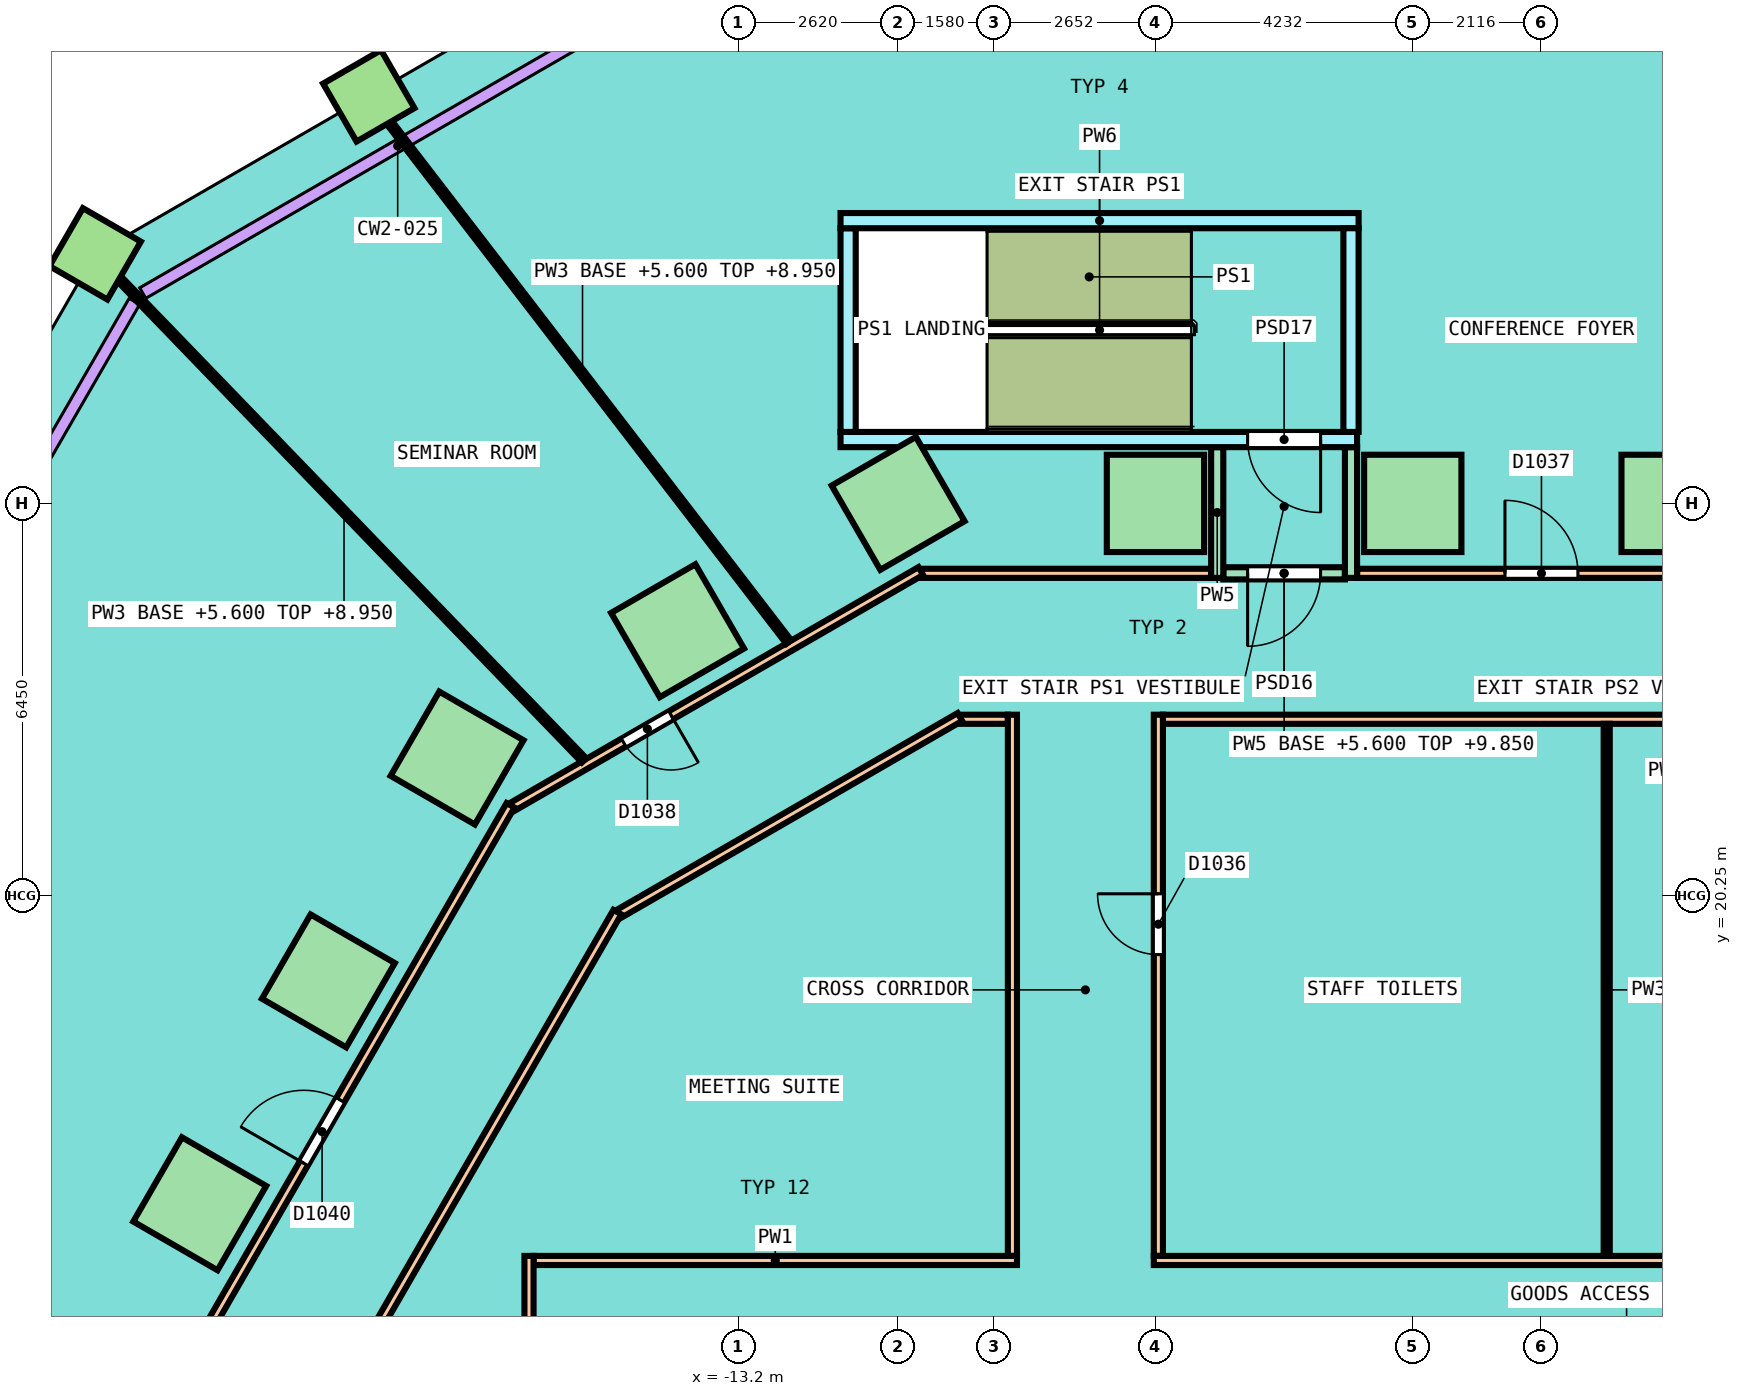
"""IFC4 building model, lengths in metres.
Left out: names, types, materials, properties, quantities, classifications, styles, units other than length and angle.
Written with IfcOpenShell. Run it as: python <this file> out.ifc"""

import sys

from ifc_helpers import new_model, si_unit, direction, frame, frame_2d, origin, origin_2d, place, context, subcontext, project, spatial, rectangle, extrude, element, fill, save


model = new_model("IFC4")
c1 = context("Model", 3, precision=1e-05, world=origin(), true_north=direction((0.0, 1.0)))
c2 = subcontext(c1, "Body", "Model", "MODEL_VIEW")
j1 = project(units=[si_unit("LENGTHUNIT", "METRE"), si_unit("PLANEANGLEUNIT", "RADIAN")], contexts=[c1])
p1 = place(None, origin())
s1 = spatial("IfcSite", under=j1, at=p1, CompositionType="ELEMENT")
p2 = place(p1, origin())
s2 = spatial("IfcBuilding", under=s1, at=p2, CompositionType="ELEMENT")
p3 = place(p2, frame((0.0, 0.0, 5.6)))
s3 = spatial("IfcBuildingStorey", under=s2, at=p3, CompositionType="ELEMENT", Elevation=5.6)
for number, where, z_axis, x_axis in (
    (1, (2.116, 26.7, 0.0), (0.0, 0.0, 1.0), (-1.0, 0.0, 0.0)),
    (2, (-2.116, 26.7, 0.0), (0.0, 0.0, 1.0), (-1.0, 0.0, 0.0)),
    (3, (-6.348, 26.7, 0.0), (0.0, 0.0, 1.0), (-1.0, 0.0, 0.0)),
    (4, (-10.58, 26.7, 0.0), (0.0, 0.0, 1.0), (-0.866, -0.5, 0.0)),
    (5, (-14.206, 24.606, 0.0), (0.0, 0.0, 1.0), (-0.866, -0.5, 0.0)),
    (6, (-17.833, 22.512, 0.0), (0.0, 0.0, 1.0), (-0.5, -0.866, 0.0)),
    (7, (-19.949, 18.847, 0.0), (0.0, 0.0, 1.0), (-0.5, -0.866, 0.0)),
    (8, (-22.065, 15.183, 0.0), (0.0, 0.0, 1.0), (-0.5, -0.866, 0.0)),
):
    element("IfcColumn", number, at=place(p3, frame(where, z_axis=z_axis, x_axis=x_axis)), inside=s3, PredefinedType="COLUMN", context=c2, shape_type="SweptSolid", body=[
        extrude(rectangle(XDim=1.6, YDim=1.6, at=origin_2d()), origin(), (0.0, 0.0, 1.0), 4.25),
    ])
for number, where, z_axis, x_axis in (
    (9, (-19.285, 33.402, 0.0), (0.0, 0.0, 1.0), (-0.866, -0.5, 0.0)),
    (10, (-23.785, 30.804, 0.0), (0.0, 0.0, 1.0), (-0.5, -0.866, 0.0)),
):
    element("IfcColumn", number, at=place(p3, frame(where, z_axis=z_axis, x_axis=x_axis)), inside=s3, PredefinedType="COLUMN", context=c2, shape_type="SweptSolid", body=[
        extrude(rectangle(XDim=1.1, YDim=1.1, at=origin_2d()), origin(), (0.0, 0.0, 1.0), 4.25),
    ])
p4 = place(p3, frame((-9.554, 23.15, 0.0), z_axis=(0.0, 0.0, 1.0), x_axis=(1.0, 0.0, 0.0)))
e11 = element("IfcWall", 11, at=p4, inside=s3, PredefinedType="PARTITIONING", context=c2, shape_type="SweptSolid", body=[
    extrude(rectangle(XDim=0.779, YDim=0.15, at=frame_2d((0.389, 0.0))), origin(), (0.0, 0.0, 1.0), 3.2),
])
p5 = place(p3, frame((-6.225, 23.15, 0.0), z_axis=(0.0, 0.0, 1.0), x_axis=(1.0, 0.0, 0.0)))
e12 = element("IfcWall", 12, at=p5, inside=s3, PredefinedType="PARTITIONING", context=c2, shape_type="SweptSolid", body=[
    extrude(rectangle(XDim=15.929, YDim=0.15, at=frame_2d((7.964, 0.0))), origin(), (0.0, 0.0, 1.0), 3.2),
])
p6 = place(p3, frame((-10.197, 25.55, 0.0), z_axis=(0.0, 0.0, 1.0), x_axis=(1.0, 0.0, 0.0)))
e13 = element("IfcWall", 13, at=p6, inside=s3, PredefinedType="PARTITIONING", context=c2, shape_type="SweptSolid", body=[
    extrude(rectangle(XDim=4.765, YDim=0.15, at=frame_2d((2.382, 0.0))), origin(), (0.0, 0.0, 1.0), 3.2),
])
p7 = place(p3, frame((-3.032, 25.55, 0.0), z_axis=(0.0, 0.0, 1.0), x_axis=(1.0, 0.0, 0.0)))
e14 = element("IfcWall", 14, at=p7, inside=s3, PredefinedType="PARTITIONING", context=c2, shape_type="SweptSolid", body=[
    extrude(rectangle(XDim=6.064, YDim=0.15, at=frame_2d((3.032, 0.0))), origin(), (0.0, 0.0, 1.0), 3.2),
])
p8 = place(p7, frame((2.432, 0.0, 0.0)))
e15 = element("IfcOpeningElement", 15, at=p8, cuts=e14, PredefinedType="OPENING", context=c2, shape_type="SweptSolid", body=[
    extrude(rectangle(XDim=1.2, YDim=2.1, at=frame_2d((0.6, 1.05))), frame((0.0, 0.085, 0.0), z_axis=(0.0, -1.0, 0.0), x_axis=(1.0, 0.0, 0.0)), (0.0, 0.0, 1.0), 0.17),
])
p9 = place(p3, frame((-16.926, 21.708, 0.0), z_axis=(0.0, 0.0, 1.0), x_axis=(0.866023143435, 0.50000391502, 0.0)))
e16 = element("IfcWall", 16, at=p9, inside=s3, PredefinedType="PARTITIONING", context=c2, shape_type="SweptSolid", body=[
    extrude(rectangle(XDim=7.759, YDim=0.15, at=frame_2d((3.879, 0.0))), origin(), (0.0, 0.0, 1.0), 3.2),
])
p10 = place(p9, frame((2.117, 0.0, 0.0)))
e17 = element("IfcOpeningElement", 17, at=p10, cuts=e16, PredefinedType="OPENING", context=c2, shape_type="SweptSolid", body=[
    extrude(rectangle(XDim=0.9, YDim=2.1, at=frame_2d((0.45, 1.05))), frame((0.0, 0.085, 0.0), z_axis=(0.0, -1.0, 0.0), x_axis=(1.0, 0.0, 0.0)), (0.0, 0.0, 1.0), 0.17),
])
p11 = place(p3, frame((-15.169, 19.951, 0.0), z_axis=(0.0, 0.0, 1.0), x_axis=(0.866024786089, 0.500001069878, 0.0)))
e18 = element("IfcWall", 18, at=p11, inside=s3, PredefinedType="PARTITIONING", context=c2, shape_type="SweptSolid", body=[
    extrude(rectangle(XDim=6.473, YDim=0.15, at=frame_2d((3.236, 0.0))), origin(), (0.0, 0.0, 1.0), 3.2),
])
p12 = place(p3, frame((-24.825, 3.301, 0.0), z_axis=(0.0, 0.0, 1.0), x_axis=(0.499992422807, 0.866029778435, 0.0)))
e19 = element("IfcWall", 19, at=p12, inside=s3, PredefinedType="PARTITIONING", context=c2, shape_type="SweptSolid", body=[
    extrude(rectangle(XDim=19.257, YDim=0.15, at=frame_2d((9.628, 0.0))), origin(), (0.0, 0.0, 1.0), 3.2),
])
p13 = place(p12, frame((9.074, 0.0, 0.0)))
e20 = element("IfcOpeningElement", 20, at=p13, cuts=e19, PredefinedType="OPENING", context=c2, shape_type="SweptSolid", body=[
    extrude(rectangle(XDim=1.0, YDim=2.1, at=frame_2d((0.5, 1.05))), frame((0.0, 0.085, 0.0), z_axis=(0.0, -1.0, 0.0), x_axis=(1.0, 0.0, 0.0)), (0.0, 0.0, 1.0), 0.17),
])
p14 = place(p3, frame((-27.225, 3.944, 0.0), z_axis=(0.0, 0.0, 1.0), x_axis=(0.499997805905, 0.866026670542, 0.0)))
e21 = element("IfcWall", 21, at=p14, inside=s3, PredefinedType="PARTITIONING", context=c2, shape_type="SweptSolid", body=[
    extrude(rectangle(XDim=20.543, YDim=0.15, at=frame_2d((10.272, 0.0))), origin(), (0.0, 0.0, 1.0), 3.2),
])
p15 = place(p14, frame((13.746, 0.0, 0.0)))
e22 = element("IfcOpeningElement", 22, at=p15, cuts=e21, PredefinedType="OPENING", context=c2, shape_type="SweptSolid", body=[
    extrude(rectangle(XDim=1.2, YDim=2.1, at=frame_2d((0.6, 1.05))), frame((0.0, 0.085, 0.0), z_axis=(0.0, -1.0, 0.0), x_axis=(1.0, 0.0, 0.0)), (0.0, 0.0, 1.0), 0.17),
])
p16 = place(p3, frame((-6.3, 14.325, 0.0), z_axis=(0.0, 0.0, 1.0), x_axis=(0.0, 1.0, 0.0)))
e23 = element("IfcWall", 23, at=p16, inside=s3, PredefinedType="PARTITIONING", context=c2, shape_type="SweptSolid", body=[
    extrude(rectangle(XDim=8.9, YDim=0.15, at=frame_2d((4.45, 0.0))), origin(), (0.0, 0.0, 1.0), 3.2),
])
p17 = place(p16, frame((4.955, 0.0, 0.0)))
e24 = element("IfcOpeningElement", 24, at=p17, cuts=e23, PredefinedType="OPENING", context=c2, shape_type="SweptSolid", body=[
    extrude(rectangle(XDim=1.0, YDim=2.1, at=frame_2d((0.5, 1.05))), frame((0.0, 0.085, 0.0), z_axis=(0.0, -1.0, 0.0), x_axis=(1.0, 0.0, 0.0)), (0.0, 0.0, 1.0), 0.17),
])
p18 = place(p3, frame((-8.7, 14.325, 0.0), z_axis=(0.0, 0.0, 1.0), x_axis=(0.0, 1.0, 0.0)))
e25 = element("IfcWall", 25, at=p18, inside=s3, PredefinedType="PARTITIONING", context=c2, shape_type="SweptSolid", body=[
    extrude(rectangle(XDim=8.9, YDim=0.15, at=frame_2d((4.45, 0.0))), origin(), (0.0, 0.0, 1.0), 3.2),
])
p19 = place(p3, frame((-16.575, 14.25, 0.0), z_axis=(0.0, 0.0, 1.0), x_axis=(1.0, 0.0, 0.0)))
e26 = element("IfcWall", 26, at=p19, inside=s3, PredefinedType="PARTITIONING", context=c2, shape_type="SweptSolid", body=[
    extrude(rectangle(XDim=7.95, YDim=0.15, at=frame_2d((3.975, 0.0))), origin(), (0.0, 0.0, 1.0), 3.2),
])
p20 = place(p3, frame((-6.375, 14.25, 0.0), z_axis=(0.0, 0.0, 1.0), x_axis=(1.0, 0.0, 0.0)))
e27 = element("IfcWall", 27, at=p20, inside=s3, PredefinedType="PARTITIONING", context=c2, shape_type="SweptSolid", body=[
    extrude(rectangle(XDim=23.1, YDim=0.15, at=frame_2d((11.55, 0.0))), origin(), (0.0, 0.0, 1.0), 3.2),
])
p21 = place(p3, frame((-16.65, -4.875, 0.0), z_axis=(0.0, 0.0, 1.0), x_axis=(0.0, 1.0, 0.0)))
e28 = element("IfcWall", 28, at=p21, inside=s3, PredefinedType="PARTITIONING", context=c2, shape_type="SweptSolid", body=[
    extrude(rectangle(XDim=19.2, YDim=0.15, at=frame_2d((9.6, 0.0))), origin(), (0.0, 0.0, 1.0), 3.2),
])
p22 = place(p21, frame((2.843, 0.0, 0.0)))
e29 = element("IfcOpeningElement", 29, at=p22, cuts=e28, PredefinedType="OPENING", context=c2, shape_type="SweptSolid", body=[
    extrude(rectangle(XDim=1.2, YDim=2.1, at=frame_2d((0.6, 1.05))), frame((0.0, 0.085, 0.0), z_axis=(0.0, -1.0, 0.0), x_axis=(1.0, 0.0, 0.0)), (0.0, 0.0, 1.0), 0.17),
])
p23 = place(p3, frame((-5.232, 25.55, 0.0), z_axis=(0.0, 0.0, 1.0), x_axis=(1.0, 0.0, 0.0)))
e30 = element("IfcWall", 30, at=p23, inside=s3, PredefinedType="PARTITIONING", context=c2, shape_type="SweptSolid", body=[
    extrude(rectangle(XDim=2.0, YDim=0.2, at=frame_2d((1.0, 0.0))), origin(), (0.0, 0.0, 1.0), 4.25),
])
p24 = place(p23, frame((0.4, 0.0, 0.0)))
e31 = element("IfcOpeningElement", 31, at=p24, cuts=e30, PredefinedType="OPENING", context=c2, shape_type="SweptSolid", body=[
    extrude(rectangle(XDim=1.2, YDim=2.1, at=frame_2d((0.6, 1.05))), frame((0.0, 0.11, 0.0), z_axis=(0.0, -1.0, 0.0), x_axis=(1.0, 0.0, 0.0)), (0.0, 0.0, 1.0), 0.22),
])
for number, where, z_axis, x_axis in (
    (32, (-5.332, 25.475, 0.0), (0.0, 0.0, 1.0), (0.0, 1.0, 0.0)),
    (33, (-3.132, 25.475, 0.0), (0.0, 0.0, 1.0), (0.0, 1.0, 0.0)),
):
    element("IfcWall", number, at=place(p3, frame(where, z_axis=z_axis, x_axis=x_axis)), inside=s3, PredefinedType="PARTITIONING", context=c2, shape_type="SweptSolid", body=[
        extrude(rectangle(XDim=2.15, YDim=0.2, at=frame_2d((1.075, 0.0))), origin(), (0.0, 0.0, 1.0), 3.35),
    ])
p25 = place(p3, frame((1.073, 14.325, 0.0), z_axis=(0.0, 0.0, 1.0), x_axis=(0.0, 1.0, 0.0)))
e34 = element("IfcWall", 34, at=p25, inside=s3, PredefinedType="PARTITIONING", context=c2, shape_type="SweptSolid", body=[
    extrude(rectangle(XDim=8.75, YDim=0.1, at=frame_2d((4.375, 0.0))), origin(), (0.0, 0.0, 1.0), 3.2),
])
p26 = place(p3, frame((-19.162, 33.242, 0.0), z_axis=(0.0, 0.0, 1.0), x_axis=(0.609546416877, -0.79275038043, 0.0)))
e35 = element("IfcWall", 35, at=p26, inside=s3, PredefinedType="PARTITIONING", context=c2, shape_type="SweptSolid", body=[
    extrude(rectangle(XDim=11.129, YDim=0.1, at=frame_2d((5.564, 0.0))), origin(), (0.0, 0.0, 1.0), 3.35),
])
p27 = place(p3, frame((-23.64, 30.654, 0.0), z_axis=(0.0, 0.0, 1.0), x_axis=(0.694530893364, -0.719462881713, 0.0)))
e36 = element("IfcWall", 36, at=p27, inside=s3, PredefinedType="PARTITIONING", context=c2, shape_type="SweptSolid", body=[
    extrude(rectangle(XDim=11.369, YDim=0.1, at=frame_2d((5.685, 0.0))), origin(), (0.0, 0.0, 1.0), 3.35),
])
p28 = place(p3, frame((-11.527, 27.75, 0.0), z_axis=(0.0, 0.0, 1.0), x_axis=(1.0, 0.0, 0.0)))
e37 = element("IfcWall", 37, at=p28, inside=s3, PredefinedType="SOLIDWALL", context=c2, shape_type="SweptSolid", body=[
    extrude(rectangle(XDim=8.495, YDim=0.25, at=frame_2d((4.248, 0.0))), origin(), (0.0, 0.0, 1.0), 4.25),
])
p29 = place(p28, frame((6.695, 0.0, 0.0)))
e38 = element("IfcOpeningElement", 38, at=p29, cuts=e37, PredefinedType="OPENING", context=c2, shape_type="SweptSolid", body=[
    extrude(rectangle(XDim=1.2, YDim=2.1, at=frame_2d((0.6, 1.05))), frame((0.0, 0.135, 0.0), z_axis=(0.0, -1.0, 0.0), x_axis=(1.0, 0.0, 0.0)), (0.0, 0.0, 1.0), 0.27),
])
p30 = place(p3, frame((-11.402, 27.875, 0.0), z_axis=(0.0, 0.0, 1.0), x_axis=(0.0, 1.0, 0.0)))
e39 = element("IfcWall", 39, at=p30, inside=s3, PredefinedType="SOLIDWALL", context=c2, shape_type="SweptSolid", body=[
    extrude(rectangle(XDim=3.35, YDim=0.25, at=frame_2d((1.675, 0.0))), origin(), (0.0, 0.0, 1.0), 4.25),
])
p31 = place(p3, frame((-11.527, 31.35, 0.0), z_axis=(0.0, 0.0, 1.0), x_axis=(1.0, 0.0, 0.0)))
e40 = element("IfcWall", 40, at=p31, inside=s3, PredefinedType="SOLIDWALL", context=c2, shape_type="SweptSolid", body=[
    extrude(rectangle(XDim=8.52, YDim=0.25, at=frame_2d((4.26, 0.0))), origin(), (0.0, 0.0, 1.0), 4.25),
])
p32 = place(p3, frame((-3.132, 27.875, 0.0), z_axis=(0.0, 0.0, 1.0), x_axis=(0.0, 1.0, 0.0)))
e41 = element("IfcWall", 41, at=p32, inside=s3, PredefinedType="SOLIDWALL", context=c2, shape_type="SweptSolid", body=[
    extrude(rectangle(XDim=3.35, YDim=0.25, at=frame_2d((1.675, 0.0))), origin(), (0.0, 0.0, 1.0), 4.25),
])
p33 = place(p17, origin())
e42 = element("IfcDoor", 42, at=p33, inside=s3, OperationType="SINGLE_SWING_RIGHT", PredefinedType="DOOR", context=c2, shape_type="SweptSolid", body=[
    extrude(rectangle(XDim=1.0, YDim=2.1, at=frame_2d((0.5, 1.05))), frame((0.0, 0.025, 0.0), z_axis=(0.0, -1.0, 0.0), x_axis=(1.0, 0.0, 0.0)), (0.0, 0.0, 1.0), 0.05),
])
fill(e24, e42)
p34 = place(p8, origin())
e43 = element("IfcDoor", 43, at=p34, inside=s3, OperationType="DOUBLE_DOOR_SINGLE_SWING", PredefinedType="DOOR", context=c2, shape_type="SweptSolid", body=[
    extrude(rectangle(XDim=1.2, YDim=2.1, at=frame_2d((0.6, 1.05))), frame((0.0, 0.025, 0.0), z_axis=(0.0, -1.0, 0.0), x_axis=(1.0, 0.0, 0.0)), (0.0, 0.0, 1.0), 0.05),
])
fill(e15, e43)
p35 = place(p10, origin())
e44 = element("IfcDoor", 44, at=p35, inside=s3, OperationType="SINGLE_SWING_RIGHT", PredefinedType="DOOR", context=c2, shape_type="SweptSolid", body=[
    extrude(rectangle(XDim=0.9, YDim=2.1, at=frame_2d((0.45, 1.05))), frame((0.0, 0.025, 0.0), z_axis=(0.0, -1.0, 0.0), x_axis=(1.0, 0.0, 0.0)), (0.0, 0.0, 1.0), 0.05),
])
fill(e17, e44)
p36 = place(p15, origin())
e45 = element("IfcDoor", 45, at=p36, inside=s3, OperationType="DOUBLE_DOOR_SINGLE_SWING", PredefinedType="DOOR", context=c2, shape_type="SweptSolid", body=[
    extrude(rectangle(XDim=1.2, YDim=2.1, at=frame_2d((0.6, 1.05))), frame((0.0, 0.025, 0.0), z_axis=(0.0, -1.0, 0.0), x_axis=(1.0, 0.0, 0.0)), (0.0, 0.0, 1.0), 0.05),
])
fill(e22, e45)
p37 = place(p24, origin())
e46 = element("IfcDoor", 46, at=p37, inside=s3, OperationType="SINGLE_SWING_LEFT", PredefinedType="DOOR", context=c2, shape_type="SweptSolid", body=[
    extrude(rectangle(XDim=1.2, YDim=2.1, at=frame_2d((0.6, 1.05))), frame((0.0, 0.025, 0.0), z_axis=(0.0, -1.0, 0.0), x_axis=(1.0, 0.0, 0.0)), (0.0, 0.0, 1.0), 0.05),
])
fill(e31, e46)
p38 = place(p29, origin())
e47 = element("IfcDoor", 47, at=p38, inside=s3, OperationType="SINGLE_SWING_RIGHT", PredefinedType="DOOR", context=c2, shape_type="SweptSolid", body=[
    extrude(rectangle(XDim=1.2, YDim=2.1, at=frame_2d((0.6, 1.05))), frame((0.0, 0.025, 0.0), z_axis=(0.0, -1.0, 0.0), x_axis=(1.0, 0.0, 0.0)), (0.0, 0.0, 1.0), 0.05),
])
fill(e38, e47)
save(model, sys.argv[1])
